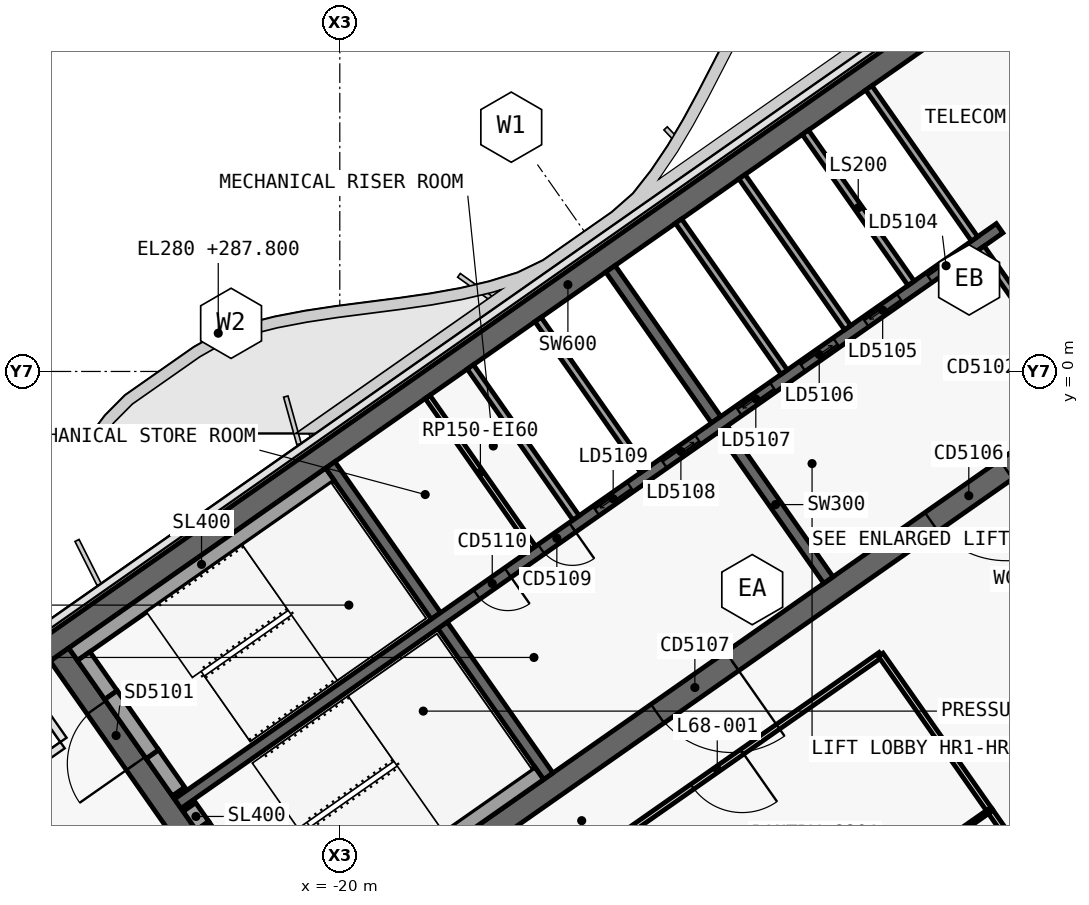
"""IFC4 building model, lengths in metres.
Left out: names, types, materials, properties, quantities, classifications, styles, units other than length and angle.
Written with IfcOpenShell. Run it as: python <this file> out.ifc"""

import sys

from ifc_helpers import new_model, si_unit, direction, frame, frame_2d, origin, place, context, subcontext, project, spatial, polyline, rectangle, outline, extrude, element, fill, save


model = new_model("IFC4")
c1 = context("Model", 3, precision=1e-05, world=origin(), true_north=direction((0.0, 1.0)))
c2 = subcontext(c1, "Body", "Model", "MODEL_VIEW")
j1 = project(units=[si_unit("LENGTHUNIT", "METRE"), si_unit("PLANEANGLEUNIT", "RADIAN")], contexts=[c1])
p1 = place(None, origin())
s1 = spatial("IfcSite", under=j1, at=p1, CompositionType="ELEMENT")
p2 = place(p1, origin())
s2 = spatial("IfcBuilding", under=s1, at=p2, CompositionType="ELEMENT")
p3 = place(p2, frame((0.0, 0.0, 287.8)))
s3 = spatial("IfcBuildingStorey", under=s2, at=p3, CompositionType="ELEMENT", Elevation=287.8)
p4 = place(p3, frame((-0.028, 12.066, 0.0), z_axis=(0.0, 0.0, 1.0), x_axis=(-0.819151382952, -0.573577380837, 0.0)))
e1 = element("IfcWall", 1, at=p4, inside=s3, PredefinedType="SHEAR", context=c2, shape_type="SweptSolid", body=[
    extrude(outline(polyline([(33.898, 0.3), (0.42, 0.3), (0.0, -0.3), (33.898, -0.3), (33.898, 0.3)])), origin(), (0.0, 0.0, 1.0), 3.9),
])
p5 = place(p3, frame((-0.028, -0.874, 0.0), z_axis=(0.0, 0.0, 1.0), x_axis=(-0.819150035022, -0.573579305871, 0.0)))
e2 = element("IfcWall", 2, at=p5, inside=s3, PredefinedType="SHEAR", context=c2, shape_type="SweptSolid", body=[
    extrude(outline(polyline([(26.476, 0.3), (0.42, 0.3), (0.0, -0.3), (26.476, -0.3), (26.476, 0.3)])), origin(), (0.0, 0.0, 1.0), 3.9),
])
p6 = place(p5, frame((2.976, 0.0, 0.0)))
e3 = element("IfcOpeningElement", 3, at=p6, cuts=e2, PredefinedType="OPENING", context=c2, shape_type="SweptSolid", body=[
    extrude(rectangle(XDim=2.4, YDim=2.1, at=frame_2d((1.2, 1.05))), frame((0.0, 0.31, 0.0), z_axis=(0.0, -1.0, 0.0), x_axis=(1.0, 0.0, 0.0)), (0.0, 0.0, 1.0), 0.62),
])
p7 = place(p5, frame((11.776, 0.0, 0.0)))
e4 = element("IfcOpeningElement", 4, at=p7, cuts=e2, PredefinedType="OPENING", context=c2, shape_type="SweptSolid", body=[
    extrude(rectangle(XDim=2.4, YDim=2.1, at=frame_2d((1.2, 1.05))), frame((0.0, 0.31, 0.0), z_axis=(0.0, -1.0, 0.0), x_axis=(1.0, 0.0, 0.0)), (0.0, 0.0, 1.0), 0.62),
])
p8 = place(p3, frame((-21.642, -15.642, 0.0), z_axis=(0.0, 0.0, 1.0), x_axis=(-0.573586866468, 0.819144740944, 0.0)))
e5 = element("IfcWall", 5, at=p8, inside=s3, PredefinedType="SHEAR", context=c2, shape_type="SweptSolid", body=[
    extrude(outline(polyline([(0.0, 0.3), (0.0, -0.3), (10.0, -0.3), (10.0, 0.3), (0.0, 0.3)])), origin(), (0.0, 0.0, 1.0), 3.9),
])
p9 = place(p8, frame((6.5, 0.0, 0.0)))
e6 = element("IfcOpeningElement", 6, at=p9, cuts=e5, PredefinedType="OPENING", context=c2, shape_type="SweptSolid", body=[
    extrude(rectangle(XDim=1.8, YDim=2.1, at=frame_2d((0.9, 1.05))), frame((0.0, 0.31, 0.0), z_axis=(0.0, -1.0, 0.0), x_axis=(1.0, 0.0, 0.0)), (0.0, 0.0, 1.0), 0.62),
])
p10 = place(p8, frame((2.3, 0.0, 0.0)))
e7 = element("IfcOpeningElement", 7, at=p10, cuts=e5, PredefinedType="OPENING", context=c2, shape_type="SweptSolid", body=[
    extrude(rectangle(XDim=1.8, YDim=2.1, at=frame_2d((0.9, 1.05))), frame((0.0, 0.31, 0.0), z_axis=(0.0, -1.0, 0.0), x_axis=(1.0, 0.0, 0.0)), (0.0, 0.0, 1.0), 0.62),
])
p11 = place(p3, frame((-7.143, -5.49, 0.0), z_axis=(0.0, 0.0, 1.0), x_axis=(-0.573617744349, 0.819123118565, 0.0)))
e8 = element("IfcWall", 8, at=p11, inside=s3, PredefinedType="SHEAR", context=c2, shape_type="SweptSolid", body=[
    extrude(outline(polyline([(4.85, 0.15), (0.0, 0.15), (0.0, -0.15), (4.85, -0.15), (4.85, 0.15)])), origin(), (0.0, 0.0, 1.0), 3.9),
])
p12 = place(p3, frame((-10.097, -1.271, 0.0), z_axis=(0.0, 0.0, 1.0), x_axis=(-0.573560315113, 0.819163332265, 0.0)))
e9 = element("IfcWall", 9, at=p12, inside=s3, PredefinedType="SHEAR", context=c2, shape_type="SweptSolid", body=[
    extrude(outline(polyline([(4.85, -0.15), (4.85, 0.15), (0.0, 0.15), (0.0, -0.15), (4.85, -0.15)])), origin(), (0.0, 0.0, 1.0), 3.9),
])
p13 = place(p3, frame((-14.515, -10.652, 0.0), z_axis=(0.0, 0.0, 1.0), x_axis=(-0.573560315113, 0.819163332265, 0.0)))
e10 = element("IfcWall", 10, at=p13, inside=s3, PredefinedType="SHEAR", context=c2, shape_type="SweptSolid", body=[
    extrude(outline(polyline([(4.85, 0.15), (0.0, 0.15), (0.0, -0.15), (4.85, -0.15), (4.85, 0.15)])), origin(), (0.0, 0.0, 1.0), 3.9),
])
p14 = place(p3, frame((-17.469, -6.433, 0.0), z_axis=(0.0, 0.0, 1.0), x_axis=(-0.573594092424, 0.81913968109, 0.0)))
e11 = element("IfcWall", 11, at=p14, inside=s3, PredefinedType="SHEAR", context=c2, shape_type="SweptSolid", body=[
    extrude(outline(polyline([(4.85, -0.15), (4.85, 0.15), (0.0, 0.15), (0.0, -0.15), (4.85, -0.15)])), origin(), (0.0, 0.0, 1.0), 3.9),
])
p15 = place(p3, frame((-2.638, 3.768, 0.0), z_axis=(0.0, 0.0, 1.0), x_axis=(-0.819155014212, -0.573572194837, 0.0)))
e12 = element("IfcWall", 12, at=p15, inside=s3, PredefinedType="SHEAR", context=c2, shape_type="SweptSolid", body=[
    extrude(outline(polyline([(26.4, 0.15), (0.0, 0.15), (0.0, -0.15), (26.4, -0.15), (26.4, 0.15)])), origin(), (0.0, 0.0, 1.0), 3.9),
])
p16 = place(p15, frame((1.169, 0.0, 0.0)))
e13 = element("IfcOpeningElement", 13, at=p16, cuts=e12, PredefinedType="OPENING", context=c2, shape_type="SweptSolid", body=[
    extrude(rectangle(XDim=1.1, YDim=2.1, at=frame_2d((0.55, 1.05))), frame((0.0, 0.16, 0.0), z_axis=(0.0, -1.0, 0.0), x_axis=(1.0, 0.0, 0.0)), (0.0, 0.0, 1.0), 0.32),
])
p17 = place(p15, frame((3.206, 0.0, 0.0)))
e14 = element("IfcOpeningElement", 14, at=p17, cuts=e12, PredefinedType="OPENING", context=c2, shape_type="SweptSolid", body=[
    extrude(rectangle(XDim=1.1, YDim=2.1, at=frame_2d((0.55, 1.05))), frame((0.0, 0.16, 0.0), z_axis=(0.0, -1.0, 0.0), x_axis=(1.0, 0.0, 0.0)), (0.0, 0.0, 1.0), 0.32),
])
p18 = place(p15, frame((5.244, 0.0, 0.0)))
e15 = element("IfcOpeningElement", 15, at=p18, cuts=e12, PredefinedType="OPENING", context=c2, shape_type="SweptSolid", body=[
    extrude(rectangle(XDim=1.1, YDim=2.1, at=frame_2d((0.55, 1.05))), frame((0.0, 0.16, 0.0), z_axis=(0.0, -1.0, 0.0), x_axis=(1.0, 0.0, 0.0)), (0.0, 0.0, 1.0), 0.32),
])
p19 = place(p15, frame((7.281, 0.0, 0.0)))
e16 = element("IfcOpeningElement", 16, at=p19, cuts=e12, PredefinedType="OPENING", context=c2, shape_type="SweptSolid", body=[
    extrude(rectangle(XDim=1.1, YDim=2.1, at=frame_2d((0.55, 1.05))), frame((0.0, 0.16, 0.0), z_axis=(0.0, -1.0, 0.0), x_axis=(1.0, 0.0, 0.0)), (0.0, 0.0, 1.0), 0.32),
])
p20 = place(p15, frame((9.688, 0.0, 0.0)))
e17 = element("IfcOpeningElement", 17, at=p20, cuts=e12, PredefinedType="OPENING", context=c2, shape_type="SweptSolid", body=[
    extrude(rectangle(XDim=1.1, YDim=2.1, at=frame_2d((0.55, 1.05))), frame((0.0, 0.16, 0.0), z_axis=(0.0, -1.0, 0.0), x_axis=(1.0, 0.0, 0.0)), (0.0, 0.0, 1.0), 0.32),
])
p21 = place(p15, frame((11.863, 0.0, 0.0)))
e18 = element("IfcOpeningElement", 18, at=p21, cuts=e12, PredefinedType="OPENING", context=c2, shape_type="SweptSolid", body=[
    extrude(rectangle(XDim=1.1, YDim=2.1, at=frame_2d((0.55, 1.05))), frame((0.0, 0.16, 0.0), z_axis=(0.0, -1.0, 0.0), x_axis=(1.0, 0.0, 0.0)), (0.0, 0.0, 1.0), 0.32),
])
p22 = place(p15, frame((13.722, 0.0, 0.0)))
e19 = element("IfcOpeningElement", 19, at=p22, cuts=e12, PredefinedType="OPENING", context=c2, shape_type="SweptSolid", body=[
    extrude(rectangle(XDim=1.0, YDim=2.1, at=frame_2d((0.5, 1.05))), frame((0.0, 0.16, 0.0), z_axis=(0.0, -1.0, 0.0), x_axis=(1.0, 0.0, 0.0)), (0.0, 0.0, 1.0), 0.32),
])
p23 = place(p15, frame((15.798, 0.0, 0.0)))
e20 = element("IfcOpeningElement", 20, at=p23, cuts=e12, PredefinedType="OPENING", context=c2, shape_type="SweptSolid", body=[
    extrude(rectangle(XDim=1.0, YDim=2.1, at=frame_2d((0.5, 1.05))), frame((0.0, 0.16, 0.0), z_axis=(0.0, -1.0, 0.0), x_axis=(1.0, 0.0, 0.0)), (0.0, 0.0, 1.0), 0.32),
])
p24 = place(p3, frame((-4.967, 2.321, 0.0), z_axis=(0.0, 0.0, 1.0), x_axis=(-0.573594092424, 0.81913968109, 0.0)))
e21 = element("IfcWall", 21, at=p24, inside=s3, PredefinedType="SOLIDWALL", context=c2, shape_type="SweptSolid", body=[
    extrude(rectangle(XDim=4.85, YDim=0.2, at=frame_2d((2.425, 0.0))), origin(), (0.0, 0.0, 1.0), 3.9),
])
p25 = place(p3, frame((-6.636, 1.152, 0.0), z_axis=(0.0, 0.0, 1.0), x_axis=(-0.573560315113, 0.819163332265, 0.0)))
e22 = element("IfcWall", 22, at=p25, inside=s3, PredefinedType="SOLIDWALL", context=c2, shape_type="SweptSolid", body=[
    extrude(rectangle(XDim=4.85, YDim=0.2, at=frame_2d((2.425, 0.0))), origin(), (0.0, 0.0, 1.0), 3.9),
])
p26 = place(p3, frame((-8.305, -0.017, 0.0), z_axis=(0.0, 0.0, 1.0), x_axis=(-0.573594092424, 0.81913968109, 0.0)))
e23 = element("IfcWall", 23, at=p26, inside=s3, PredefinedType="SOLIDWALL", context=c2, shape_type="SweptSolid", body=[
    extrude(rectangle(XDim=4.85, YDim=0.2, at=frame_2d((2.425, 0.0))), origin(), (0.0, 0.0, 1.0), 3.9),
])
p27 = place(p3, frame((-14.909, -4.641, 0.0), z_axis=(0.0, 0.0, 1.0), x_axis=(-0.573560315113, 0.819163332265, 0.0)))
e24 = element("IfcWall", 24, at=p27, inside=s3, PredefinedType="PARTITIONING", context=c2, shape_type="SweptSolid", body=[
    extrude(rectangle(XDim=4.85, YDim=0.15, at=frame_2d((2.425, 0.0))), origin(), (0.0, 0.0, 1.0), 3.62),
])
p28 = place(p3, frame((-12.001, -2.605, 0.0), z_axis=(0.0, 0.0, 1.0), x_axis=(-0.573560315113, 0.819163332265, 0.0)))
e25 = element("IfcWall", 25, at=p28, inside=s3, PredefinedType="SOLIDWALL", context=c2, shape_type="SweptSolid", body=[
    extrude(rectangle(XDim=4.85, YDim=0.2, at=frame_2d((2.425, 0.0))), origin(), (0.0, 0.0, 1.0), 3.9),
])
p29 = place(p3, frame((-13.783, -3.852, 0.0), z_axis=(0.0, 0.0, 1.0), x_axis=(-0.573594092424, 0.81913968109, 0.0)))
e26 = element("IfcWall", 26, at=p29, inside=s3, PredefinedType="SOLIDWALL", context=c2, shape_type="SweptSolid", body=[
    extrude(rectangle(XDim=4.85, YDim=0.2, at=frame_2d((2.425, 0.0))), origin(), (0.0, 0.0, 1.0), 3.9),
])
p30 = place(p3, frame((-20.259, -2.71, 0.0), z_axis=(0.0, 0.0, 1.0), x_axis=(-0.81914849389, -0.573581506813, 0.0)))
e27 = element("IfcWall", 27, at=p30, inside=s3, PredefinedType="SOLIDWALL", context=c2, shape_type="SweptSolid", body=[
    extrude(rectangle(XDim=8.25, YDim=0.4, at=frame_2d((4.125, 0.0))), origin(), (0.0, 0.0, 1.0), 3.62),
])
p31 = place(p3, frame((-24.244, -11.055, 0.0), z_axis=(0.0, 0.0, 1.0), x_axis=(-0.573571582932, 0.819155442668, 0.0)))
e28 = element("IfcWall", 28, at=p31, inside=s3, PredefinedType="SOLIDWALL", context=c2, shape_type="SweptSolid", body=[
    extrude(rectangle(XDim=1.2, YDim=0.4, at=frame_2d((0.6, 0.0))), origin(), (0.0, 0.0, 1.0), 3.62),
])
p32 = place(p3, frame((-26.022, -8.515, 0.0), z_axis=(0.0, 0.0, 1.0), x_axis=(-0.573619628835, 0.819121798889, 0.0)))
e29 = element("IfcWall", 29, at=p32, inside=s3, PredefinedType="SOLIDWALL", context=c2, shape_type="SweptSolid", body=[
    extrude(rectangle(XDim=1.25, YDim=0.4, at=frame_2d((0.625, 0.0))), origin(), (0.0, 0.0, 1.0), 3.62),
])
p33 = place(p3, frame((-24.932, -10.072, 2.15), z_axis=(0.0, 0.0, 1.0), x_axis=(-0.573591692345, 0.819141361715, 0.0)))
e30 = element("IfcWall", 30, at=p33, inside=s3, PredefinedType="SOLIDWALL", context=c2, shape_type="SweptSolid", body=[
    extrude(rectangle(XDim=1.9, YDim=0.4, at=frame_2d((0.95, 0.0))), origin(), (0.0, 0.0, 1.0), 1.47),
])
p34 = place(p3, frame((-14.753, -10.574, 0.0), z_axis=(0.0, 0.0, 1.0), x_axis=(-0.819158229677, -0.573567602601, 0.0)))
e31 = element("IfcWall", 31, at=p34, inside=s3, PredefinedType="SOLIDWALL", context=c2, shape_type="SweptSolid", body=[
    extrude(rectangle(XDim=8.25, YDim=0.4, at=frame_2d((4.125, 0.0))), origin(), (0.0, 0.0, 1.0), 3.62),
])
p35 = place(p3, frame((-23.613, -11.956, 0.0), z_axis=(0.0, 0.0, 1.0), x_axis=(-0.573435029941, 0.819251039936, 0.0)))
e32 = element("IfcWall", 32, at=p35, inside=s3, PredefinedType="SOLIDWALL", context=c2, shape_type="SweptSolid", body=[
    extrude(rectangle(XDim=0.6, YDim=0.4, at=frame_2d((0.3, 0.0))), origin(), (0.0, 0.0, 1.0), 3.62),
])
p36 = place(p3, frame((-22.523, -13.512, 2.15), z_axis=(0.0, 0.0, 1.0), x_axis=(-0.573591692345, 0.819141361715, 0.0)))
e33 = element("IfcWall", 33, at=p36, inside=s3, PredefinedType="SOLIDWALL", context=c2, shape_type="SweptSolid", body=[
    extrude(rectangle(XDim=1.9, YDim=0.4, at=frame_2d((0.95, 0.0))), origin(), (0.0, 0.0, 1.0), 1.47),
])
p37 = place(p3, frame((-0.344, -0.729, 0.0), z_axis=(0.0, 0.0, 1.0), x_axis=(-0.573560315113, 0.819163332265, 0.0)))
e34 = element("IfcWall", 34, at=p37, inside=s3, PredefinedType="SOLIDWALL", context=c2, shape_type="SweptSolid", body=[
    extrude(rectangle(XDim=4.85, YDim=0.2, at=frame_2d((2.425, 0.0))), origin(), (0.0, 0.0, 1.0), 3.62),
])
p38 = place(p37, frame((0.55, 0.0, 0.0)))
e35 = element("IfcOpeningElement", 35, at=p38, cuts=e34, PredefinedType="OPENING", context=c2, shape_type="SweptSolid", body=[
    extrude(rectangle(XDim=0.9, YDim=2.1, at=frame_2d((0.45, 1.05))), frame((0.0, 0.11, 0.0), z_axis=(0.0, -1.0, 0.0), x_axis=(1.0, 0.0, 0.0)), (0.0, 0.0, 1.0), 0.22),
])
p39 = place(p3, frame((-3.298, 3.49, 0.0), z_axis=(0.0, 0.0, 1.0), x_axis=(-0.573560315113, 0.819163332265, 0.0)))
e36 = element("IfcWall", 36, at=p39, inside=s3, PredefinedType="SOLIDWALL", context=c2, shape_type="SweptSolid", body=[
    extrude(rectangle(XDim=4.85, YDim=0.2, at=frame_2d((2.425, 0.0))), origin(), (0.0, 0.0, 1.0), 3.62),
])
p40 = place(p3, frame((-5.766, -7.456, 0.0), z_axis=(0.0, 0.0, 1.0), x_axis=(-0.819154371039, -0.573573113393, 0.0)))
e37 = element("IfcWall", 37, at=p40, inside=s3, PredefinedType="PARTITIONING", context=c2, shape_type="SweptSolid", body=[
    extrude(rectangle(XDim=10.502, YDim=0.15, at=frame_2d((5.251, 0.0))), origin(), (0.0, 0.0, 1.0), 3.05),
])
p41 = place(p40, frame((4.451, 0.0, 0.0)))
e38 = element("IfcOpeningElement", 38, at=p41, cuts=e37, PredefinedType="OPENING", context=c2, shape_type="SweptSolid", body=[
    extrude(rectangle(XDim=1.6, YDim=2.1, at=frame_2d((0.8, 1.05))), frame((0.0, 0.085, 0.0), z_axis=(0.0, -1.0, 0.0), x_axis=(1.0, 0.0, 0.0)), (0.0, 0.0, 1.0), 0.17),
])
p42 = place(p3, frame((-1.849, -13.051, 0.0), z_axis=(0.0, 0.0, 1.0), x_axis=(-0.573542889209, 0.819175533227, 0.0)))
e39 = element("IfcWall", 39, at=p42, inside=s3, PredefinedType="PARTITIONING", context=c2, shape_type="SweptSolid", body=[
    extrude(rectangle(XDim=1.831, YDim=0.15, at=frame_2d((0.916, 0.0))), origin(), (0.0, 0.0, 1.0), 3.05),
])
p43 = place(p3, frame((-2.897, -11.553, 0.0), z_axis=(0.0, 0.0, 1.0), x_axis=(-0.573593309886, 0.819140229054, 0.0)))
e40 = element("IfcWall", 40, at=p43, inside=s3, PredefinedType="PARTITIONING", context=c2, shape_type="SweptSolid", body=[
    extrude(rectangle(XDim=5.004, YDim=0.15, at=frame_2d((2.502, 0.0))), origin(), (0.0, 0.0, 1.0), 3.05),
])
p44 = place(p3, frame((-2.898, -11.552, 0.0), z_axis=(0.0, 0.0, 1.0), x_axis=(-0.819155448096, -0.573571575181, 0.0)))
e41 = element("IfcWall", 41, at=p44, inside=s3, PredefinedType="PARTITIONING", context=c2, shape_type="SweptSolid", body=[
    extrude(rectangle(XDim=10.5, YDim=0.1, at=frame_2d((5.25, 0.0))), origin(), (0.0, 0.0, 1.0), 3.05),
])
p45 = place(p44, frame((4.8, 0.0, 0.0)))
e42 = element("IfcOpeningElement", 42, at=p45, cuts=e41, PredefinedType="OPENING", context=c2, shape_type="SweptSolid", body=[
    extrude(rectangle(XDim=0.9, YDim=2.1, at=frame_2d((0.45, 1.05))), frame((0.0, 0.06, 0.0), z_axis=(0.0, -1.0, 0.0), x_axis=(1.0, 0.0, 0.0)), (0.0, 0.0, 1.0), 0.12),
])
p46 = place(p16, origin())
e43 = element("IfcDoor", 43, at=p46, inside=s3, OperationType="SLIDING_TO_LEFT", PredefinedType="DOOR", context=c2, shape_type="SweptSolid", body=[
    extrude(rectangle(XDim=1.1, YDim=2.1, at=frame_2d((0.55, 1.05))), frame((0.0, 0.025, 0.0), z_axis=(0.0, -1.0, 0.0), x_axis=(1.0, 0.0, 0.0)), (0.0, 0.0, 1.0), 0.05),
])
fill(e13, e43)
p47 = place(p17, origin())
e44 = element("IfcDoor", 44, at=p47, inside=s3, OperationType="SLIDING_TO_RIGHT", PredefinedType="DOOR", context=c2, shape_type="SweptSolid", body=[
    extrude(rectangle(XDim=1.1, YDim=2.1, at=frame_2d((0.55, 1.05))), frame((0.0, 0.025, 0.0), z_axis=(0.0, -1.0, 0.0), x_axis=(1.0, 0.0, 0.0)), (0.0, 0.0, 1.0), 0.05),
])
fill(e14, e44)
p48 = place(p18, origin())
e45 = element("IfcDoor", 45, at=p48, inside=s3, OperationType="SLIDING_TO_LEFT", PredefinedType="DOOR", context=c2, shape_type="SweptSolid", body=[
    extrude(rectangle(XDim=1.1, YDim=2.1, at=frame_2d((0.55, 1.05))), frame((0.0, 0.025, 0.0), z_axis=(0.0, -1.0, 0.0), x_axis=(1.0, 0.0, 0.0)), (0.0, 0.0, 1.0), 0.05),
])
fill(e15, e45)
p49 = place(p19, origin())
e46 = element("IfcDoor", 46, at=p49, inside=s3, OperationType="SLIDING_TO_RIGHT", PredefinedType="DOOR", context=c2, shape_type="SweptSolid", body=[
    extrude(rectangle(XDim=1.1, YDim=2.1, at=frame_2d((0.55, 1.05))), frame((0.0, 0.025, 0.0), z_axis=(0.0, -1.0, 0.0), x_axis=(1.0, 0.0, 0.0)), (0.0, 0.0, 1.0), 0.05),
])
fill(e16, e46)
p50 = place(p20, origin())
e47 = element("IfcDoor", 47, at=p50, inside=s3, OperationType="SLIDING_TO_LEFT", PredefinedType="DOOR", context=c2, shape_type="SweptSolid", body=[
    extrude(rectangle(XDim=1.1, YDim=2.1, at=frame_2d((0.55, 1.05))), frame((0.0, 0.025, 0.0), z_axis=(0.0, -1.0, 0.0), x_axis=(1.0, 0.0, 0.0)), (0.0, 0.0, 1.0), 0.05),
])
fill(e17, e47)
p51 = place(p21, origin())
e48 = element("IfcDoor", 48, at=p51, inside=s3, OperationType="SLIDING_TO_RIGHT", PredefinedType="DOOR", context=c2, shape_type="SweptSolid", body=[
    extrude(rectangle(XDim=1.1, YDim=2.1, at=frame_2d((0.55, 1.05))), frame((0.0, 0.025, 0.0), z_axis=(0.0, -1.0, 0.0), x_axis=(1.0, 0.0, 0.0)), (0.0, 0.0, 1.0), 0.05),
])
fill(e18, e48)
p52 = place(p22, origin())
e49 = element("IfcDoor", 49, at=p52, inside=s3, OperationType="SINGLE_SWING_RIGHT", PredefinedType="DOOR", context=c2, shape_type="SweptSolid", body=[
    extrude(rectangle(XDim=1.0, YDim=2.1, at=frame_2d((0.5, 1.05))), frame((0.0, 0.025, 0.0), z_axis=(0.0, -1.0, 0.0), x_axis=(1.0, 0.0, 0.0)), (0.0, 0.0, 1.0), 0.05),
])
fill(e19, e49)
p53 = place(p23, origin())
e50 = element("IfcDoor", 50, at=p53, inside=s3, OperationType="SINGLE_SWING_RIGHT", PredefinedType="DOOR", context=c2, shape_type="SweptSolid", body=[
    extrude(rectangle(XDim=1.0, YDim=2.1, at=frame_2d((0.5, 1.05))), frame((0.0, 0.025, 0.0), z_axis=(0.0, -1.0, 0.0), x_axis=(1.0, 0.0, 0.0)), (0.0, 0.0, 1.0), 0.05),
])
fill(e20, e50)
p54 = place(p6, origin())
e51 = element("IfcDoor", 51, at=p54, inside=s3, OperationType="DOUBLE_DOOR_SINGLE_SWING", PredefinedType="DOOR", context=c2, shape_type="SweptSolid", body=[
    extrude(rectangle(XDim=2.4, YDim=2.1, at=frame_2d((1.2, 1.05))), frame((0.0, 0.025, 0.0), z_axis=(0.0, -1.0, 0.0), x_axis=(1.0, 0.0, 0.0)), (0.0, 0.0, 1.0), 0.05),
])
fill(e3, e51)
p55 = place(p7, origin())
e52 = element("IfcDoor", 52, at=p55, inside=s3, OperationType="DOUBLE_DOOR_SINGLE_SWING", PredefinedType="DOOR", context=c2, shape_type="SweptSolid", body=[
    extrude(rectangle(XDim=2.4, YDim=2.1, at=frame_2d((1.2, 1.05))), frame((0.0, 0.025, 0.0), z_axis=(0.0, -1.0, 0.0), x_axis=(1.0, 0.0, 0.0)), (0.0, 0.0, 1.0), 0.05),
])
fill(e4, e52)
p56 = place(p9, origin())
e53 = element("IfcDoor", 53, at=p56, inside=s3, OperationType="DOUBLE_DOOR_SINGLE_SWING", PredefinedType="DOOR", context=c2, shape_type="SweptSolid", body=[
    extrude(rectangle(XDim=1.8, YDim=2.1, at=frame_2d((0.9, 1.05))), frame((0.0, 0.025, 0.0), z_axis=(0.0, -1.0, 0.0), x_axis=(1.0, 0.0, 0.0)), (0.0, 0.0, 1.0), 0.05),
])
fill(e6, e53)
p57 = place(p41, origin())
e54 = element("IfcDoor", 54, at=p57, inside=s3, OperationType="DOUBLE_DOOR_SINGLE_SWING", PredefinedType="DOOR", context=c2, shape_type="SweptSolid", body=[
    extrude(rectangle(XDim=1.6, YDim=2.1, at=frame_2d((0.8, 1.05))), frame((0.0, 0.025, 0.0), z_axis=(0.0, -1.0, 0.0), x_axis=(1.0, 0.0, 0.0)), (0.0, 0.0, 1.0), 0.05),
])
fill(e38, e54)
save(model, sys.argv[1])
